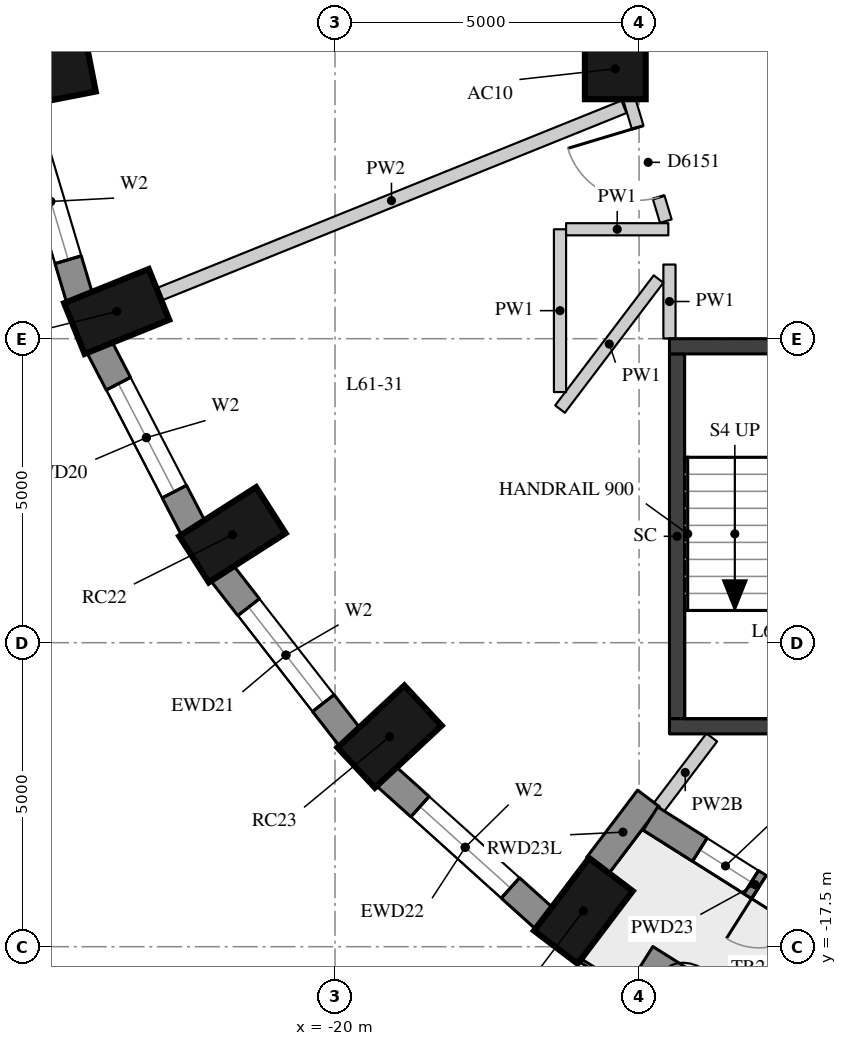
"""IFC4 building model, lengths in metres.
Left out: names, types, materials, properties, quantities, classifications, styles, units other than length and angle.
Written with IfcOpenShell. Run it as: python <this file> out.ifc"""

import sys

from ifc_helpers import new_model, si_unit, direction, frame, frame_2d, origin, origin_2d, place, context, subcontext, project, spatial, rectangle, extrude, element, fill, save


model = new_model("IFC4")
c1 = context("Model", 3, precision=1e-05, world=origin(), true_north=direction((0.0, 1.0)))
c2 = subcontext(c1, "Body", "Model", "MODEL_VIEW")
j1 = project(units=[si_unit("LENGTHUNIT", "METRE"), si_unit("PLANEANGLEUNIT", "RADIAN")], contexts=[c1])
p1 = place(None, origin())
s1 = spatial("IfcSite", under=j1, at=p1, CompositionType="ELEMENT")
p2 = place(p1, origin())
s2 = spatial("IfcBuilding", under=s1, at=p2, CompositionType="ELEMENT")
p3 = place(p2, frame((0.0, 0.0, 215.6)))
s3 = spatial("IfcBuildingStorey", under=s2, at=p3, CompositionType="ELEMENT", Elevation=215.6)
for number, where, z_axis, x_axis in (
    (1, (-24.757, -3.137, 0.0), (0.0, 0.0, 1.0), (-0.981, -0.192, 0.0)),
    (2, (-23.591, -7.052, 0.0), (0.0, 0.0, 1.0), (-0.927, -0.374, 0.0)),
    (3, (-21.687, -10.725, 0.0), (0.0, 0.0, 1.0), (-0.842, -0.539, 0.0)),
    (4, (-19.102, -14.045, 0.0), (0.0, 0.0, 1.0), (-0.732, -0.681, 0.0)),
    (5, (-15.916, -16.911, 0.0), (0.0, 0.0, 1.0), (-0.604, -0.797, 0.0)),
):
    element("IfcColumn", number, at=place(p3, frame(where, z_axis=z_axis, x_axis=x_axis)), inside=s3, PredefinedType="COLUMN", context=c2, shape_type="SweptSolid", body=[
        extrude(rectangle(XDim=1.5, YDim=0.9, at=origin_2d()), origin(), (0.0, 0.0, 1.0), 3.3),
    ])
p4 = place(p3, frame((-15.391, -3.062, 0.0), z_axis=(0.0, 0.0, 1.0), x_axis=(1.0, 0.0, 0.0)))
e6 = element("IfcColumn", 6, at=p4, inside=s3, PredefinedType="COLUMN", context=c2, shape_type="SweptSolid", body=[
    extrude(rectangle(XDim=1.0, YDim=1.0, at=origin_2d()), origin(), (0.0, 0.0, 1.0), 3.3),
])
p5 = place(p3, frame((-25.148, -3.652, 0.0), z_axis=(0.0, 0.0, 1.0), x_axis=(0.285444972963, -0.958395099847, 0.0)))
e7 = element("IfcWall", 7, at=p5, inside=s3, PredefinedType="SOLIDWALL", context=c2, shape_type="SweptSolid", body=[
    extrude(rectangle(XDim=3.32, YDim=0.45, at=frame_2d((1.66, 0.0))), origin(), (0.0, 0.0, 1.0), 3.02),
])
p6 = place(p5, frame((0.66, 0.0, 0.4)))
e8 = element("IfcOpeningElement", 8, at=p6, cuts=e7, PredefinedType="OPENING", context=c2, shape_type="SweptSolid", body=[
    extrude(rectangle(XDim=2.0, YDim=1.75, at=frame_2d((1.0, 0.875))), frame((0.0, 0.235, 0.0), z_axis=(0.0, -1.0, 0.0), x_axis=(1.0, 0.0, 0.0)), (0.0, 0.0, 1.0), 0.47),
])
p7 = place(p3, frame((-23.878, -7.632, 0.0), z_axis=(0.0, 0.0, 1.0), x_axis=(0.460232593174, -0.887798378113, 0.0)))
e9 = element("IfcWall", 9, at=p7, inside=s3, PredefinedType="SOLIDWALL", context=c2, shape_type="SweptSolid", body=[
    extrude(rectangle(XDim=3.371, YDim=0.45, at=frame_2d((1.685, 0.0))), origin(), (0.0, 0.0, 1.0), 3.02),
])
p8 = place(p7, frame((0.685, 0.0, 0.4)))
e10 = element("IfcOpeningElement", 10, at=p8, cuts=e9, PredefinedType="OPENING", context=c2, shape_type="SweptSolid", body=[
    extrude(rectangle(XDim=2.0, YDim=1.75, at=frame_2d((1.0, 0.875))), frame((0.0, 0.235, 0.0), z_axis=(0.0, -1.0, 0.0), x_axis=(1.0, 0.0, 0.0)), (0.0, 0.0, 1.0), 0.47),
])
p9 = place(p3, frame((-21.863, -11.348, 0.0), z_axis=(0.0, 0.0, 1.0), x_axis=(0.614255239631, -0.789107407509, 0.0)))
e11 = element("IfcWall", 11, at=p9, inside=s3, PredefinedType="SOLIDWALL", context=c2, shape_type="SweptSolid", body=[
    extrude(rectangle(XDim=3.438, YDim=0.45, at=frame_2d((1.719, 0.0))), origin(), (0.0, 0.0, 1.0), 3.02),
])
p10 = place(p9, frame((0.719, 0.0, 0.4)))
e12 = element("IfcOpeningElement", 12, at=p10, cuts=e11, PredefinedType="OPENING", context=c2, shape_type="SweptSolid", body=[
    extrude(rectangle(XDim=2.0, YDim=1.75, at=frame_2d((1.0, 0.875))), frame((0.0, 0.235, 0.0), z_axis=(0.0, -1.0, 0.0), x_axis=(1.0, 0.0, 0.0)), (0.0, 0.0, 1.0), 0.47),
])
p11 = place(p3, frame((-19.165, -14.69, 0.0), z_axis=(0.0, 0.0, 1.0), x_axis=(0.743442727602, -0.668799604348, 0.0)))
e13 = element("IfcWall", 13, at=p11, inside=s3, PredefinedType="SOLIDWALL", context=c2, shape_type="SweptSolid", body=[
    extrude(rectangle(XDim=3.513, YDim=0.45, at=frame_2d((1.756, 0.0))), origin(), (0.0, 0.0, 1.0), 3.02),
])
p12 = place(p11, frame((0.756, 0.0, 0.4)))
e14 = element("IfcOpeningElement", 14, at=p12, cuts=e13, PredefinedType="OPENING", context=c2, shape_type="SweptSolid", body=[
    extrude(rectangle(XDim=2.0, YDim=1.75, at=frame_2d((1.0, 0.875))), frame((0.0, 0.235, 0.0), z_axis=(0.0, -1.0, 0.0), x_axis=(1.0, 0.0, 0.0)), (0.0, 0.0, 1.0), 0.47),
])
p13 = place(p3, frame((-15.685, -16.17, 0.0), z_axis=(0.0, 0.0, 1.0), x_axis=(0.603644757989, 0.797253414011, 0.0)))
e15 = element("IfcWall", 15, at=p13, inside=s3, PredefinedType="SOLIDWALL", context=c2, shape_type="SweptSolid", body=[
    extrude(rectangle(XDim=1.391, YDim=0.45, at=frame_2d((0.695, 0.0))), origin(), (0.0, 0.0, 1.0), 2.57),
])
p14 = place(p3, frame((-14.813, -15.392, 0.0), z_axis=(0.0, 0.0, 1.0), x_axis=(0.84545185308, -0.534051649303, 0.0)))
e16 = element("IfcWall", 16, at=p14, inside=s3, PredefinedType="SOLIDWALL", context=c2, shape_type="SweptSolid", body=[
    extrude(rectangle(XDim=4.071, YDim=0.45, at=frame_2d((2.036, 0.0))), origin(), (0.0, 0.0, 1.0), 3.02),
])
p15 = place(p14, frame((0.961, 0.0, 0.4)))
e17 = element("IfcOpeningElement", 17, at=p15, cuts=e16, PredefinedType="OPENING", context=c2, shape_type="SweptSolid", body=[
    extrude(rectangle(XDim=1.0, YDim=1.75, at=frame_2d((0.5, 0.875))), frame((0.0, 0.235, 0.0), z_axis=(0.0, -1.0, 0.0), x_axis=(1.0, 0.0, 0.0)), (0.0, 0.0, 1.0), 0.47),
])
p16 = place(p14, frame((2.111, 0.0, 0.0)))
e18 = element("IfcOpeningElement", 18, at=p16, cuts=e16, PredefinedType="OPENING", context=c2, shape_type="SweptSolid", body=[
    extrude(rectangle(XDim=1.0, YDim=2.15, at=frame_2d((0.5, 1.075))), frame((0.0, 0.235, 0.0), z_axis=(0.0, -1.0, 0.0), x_axis=(1.0, 0.0, 0.0)), (0.0, 0.0, 1.0), 0.47),
])
p17 = place(p3, frame((-14.96, -17.793, 0.0), z_axis=(0.0, 0.0, 1.0), x_axis=(0.846126379677, -0.532982316418, 0.0)))
e19 = element("IfcWall", 19, at=p17, inside=s3, PredefinedType="USERDEFINED", context=c2, shape_type="SweptSolid", body=[
    extrude(rectangle(XDim=1.8, YDim=0.7, at=frame_2d((0.9, 0.0))), origin(), (0.0, 0.0, 1.0), 0.75),
])
p18 = place(p3, frame((-14.375, -13.75, -0.28), z_axis=(0.0, 0.0, 1.0), x_axis=(0.0, 1.0, 0.0)))
e20 = element("IfcWall", 20, at=p18, inside=s3, PredefinedType="SHEAR", context=c2, shape_type="SweptSolid", body=[
    extrude(rectangle(XDim=6.0, YDim=0.25, at=frame_2d((3.0, 0.0))), origin(), (0.0, 0.0, 1.0), 3.3),
])
for number, where, z_axis, x_axis in (
    (21, (-14.5, -7.625, -0.28), (0.0, 0.0, 1.0), (1.0, 0.0, 0.0)),
    (22, (-14.5, -13.875, -0.28), (0.0, 0.0, 1.0), (1.0, 0.0, 0.0)),
):
    element("IfcWall", number, at=place(p3, frame(where, z_axis=z_axis, x_axis=x_axis)), inside=s3, PredefinedType="SHEAR", context=c2, shape_type="SweptSolid", body=[
        extrude(rectangle(XDim=5.2, YDim=0.25, at=frame_2d((2.6, 0.0))), origin(), (0.0, 0.0, 1.0), 3.3),
    ])
p19 = place(p3, frame((-14.5, -7.496, 0.0), z_axis=(0.0, 0.0, 1.0), x_axis=(0.0, 1.0, 0.0)))
e23 = element("IfcWall", 23, at=p19, inside=s3, PredefinedType="PARTITIONING", context=c2, shape_type="SweptSolid", body=[
    extrude(rectangle(XDim=1.216, YDim=0.2, at=frame_2d((0.608, 0.0))), origin(), (0.0, 0.0, 1.0), 3.02),
])
p20 = place(p3, frame((-14.679, -6.518, 0.0), z_axis=(0.0, 0.0, 1.0), x_axis=(-0.603820908912, -0.797120009761, 0.0)))
e24 = element("IfcWall", 24, at=p20, inside=s3, PredefinedType="PARTITIONING", context=c2, shape_type="SweptSolid", body=[
    extrude(rectangle(XDim=2.684, YDim=0.2, at=frame_2d((1.342, 0.0))), origin(), (0.0, 0.0, 1.0), 3.02),
])
p21 = place(p3, frame((-16.3, -8.377, 0.0), z_axis=(0.0, 0.0, 1.0), x_axis=(0.0, 1.0, 0.0)))
e25 = element("IfcWall", 25, at=p21, inside=s3, PredefinedType="PARTITIONING", context=c2, shape_type="SweptSolid", body=[
    extrude(rectangle(XDim=2.677, YDim=0.2, at=frame_2d((1.339, 0.0))), origin(), (0.0, 0.0, 1.0), 3.02),
])
p22 = place(p3, frame((-16.2, -5.7, 0.0), z_axis=(0.0, 0.0, 1.0), x_axis=(1.0, 0.0, 0.0)))
e26 = element("IfcWall", 26, at=p22, inside=s3, PredefinedType="PARTITIONING", context=c2, shape_type="SweptSolid", body=[
    extrude(rectangle(XDim=1.681, YDim=0.2, at=frame_2d((0.841, 0.0))), origin(), (0.0, 0.0, 1.0), 3.02),
])
p23 = place(p3, frame((-14.56, -5.567, 0.0), z_axis=(0.0, 0.0, 1.0), x_axis=(-0.287410918602, 0.95780737305, 0.0)))
e27 = element("IfcWall", 27, at=p23, inside=s3, PredefinedType="PARTITIONING", context=c2, shape_type="SweptSolid", body=[
    extrude(rectangle(XDim=6.751, YDim=0.2, at=frame_2d((3.376, 0.0))), origin(), (0.0, 0.0, 1.0), 2.52),
])
p24 = place(p23, frame((3.561, 0.0, 0.0)))
e28 = element("IfcOpeningElement", 28, at=p24, cuts=e27, PredefinedType="OPENING", context=c2, shape_type="SweptSolid", body=[
    extrude(rectangle(XDim=1.1, YDim=2.1, at=frame_2d((0.55, 1.05))), frame((0.0, 0.11, 0.0), z_axis=(0.0, -1.0, 0.0), x_axis=(1.0, 0.0, 0.0)), (0.0, 0.0, 1.0), 0.22),
])
p25 = place(p23, frame((0.41, 0.0, 0.0)))
e29 = element("IfcOpeningElement", 29, at=p25, cuts=e27, PredefinedType="OPENING", context=c2, shape_type="SweptSolid", body=[
    extrude(rectangle(XDim=1.2, YDim=2.1, at=frame_2d((0.6, 1.05))), frame((0.0, 0.11, 0.0), z_axis=(0.0, -1.0, 0.0), x_axis=(1.0, 0.0, 0.0)), (0.0, 0.0, 1.0), 0.22),
])
p26 = place(p3, frame((-22.896, -6.771, 0.0), z_axis=(0.0, 0.0, 1.0), x_axis=(0.92738233242, 0.374114968313, 0.0)))
e30 = element("IfcWall", 30, at=p26, inside=s3, PredefinedType="PARTITIONING", context=c2, shape_type="SweptSolid", body=[
    extrude(rectangle(XDim=8.246, YDim=0.22, at=frame_2d((4.123, 0.0))), origin(), (0.0, 0.0, 1.0), 3.02),
])
p27 = place(p3, frame((-14.677, -15.211, 0.0), z_axis=(0.0, 0.0, 1.0), x_axis=(0.603665965776, 0.797237355976, 0.0)))
e31 = element("IfcWall", 31, at=p27, inside=s3, PredefinedType="PARTITIONING", context=c2, shape_type="SweptSolid", body=[
    extrude(rectangle(XDim=1.447, YDim=0.22, at=frame_2d((0.723, 0.0))), origin(), (0.0, 0.0, 1.0), 2.57),
])
p28 = place(p3, frame((-11.927, -3.927, 0.0), z_axis=(0.0, 0.0, 1.0), x_axis=(-0.382730523909, 0.923860025149, 0.0)))
e32 = element("IfcWall", 32, at=p28, inside=s3, PredefinedType="PARTITIONING", context=c2, shape_type="SweptSolid", body=[
    extrude(rectangle(XDim=4.251, YDim=0.1, at=frame_2d((2.125, 0.0))), origin(), (0.0, 0.0, 1.0), 3.02),
])
p29 = place(p6, origin())
e33 = element("IfcWindow", 33, at=p29, inside=s3, PartitioningType="SINGLE_PANEL", PredefinedType="WINDOW", context=c2, shape_type="SweptSolid", body=[
    extrude(rectangle(XDim=2.0, YDim=1.75, at=frame_2d((1.0, 0.875))), frame((0.0, 0.035, 0.0), z_axis=(0.0, -1.0, 0.0), x_axis=(1.0, 0.0, 0.0)), (0.0, 0.0, 1.0), 0.06),
])
fill(e8, e33)
p30 = place(p8, origin())
e34 = element("IfcWindow", 34, at=p30, inside=s3, PartitioningType="SINGLE_PANEL", PredefinedType="WINDOW", context=c2, shape_type="SweptSolid", body=[
    extrude(rectangle(XDim=2.0, YDim=1.75, at=frame_2d((1.0, 0.875))), frame((0.0, 0.035, 0.0), z_axis=(0.0, -1.0, 0.0), x_axis=(1.0, 0.0, 0.0)), (0.0, 0.0, 1.0), 0.06),
])
fill(e10, e34)
p31 = place(p10, origin())
e35 = element("IfcWindow", 35, at=p31, inside=s3, PartitioningType="SINGLE_PANEL", PredefinedType="WINDOW", context=c2, shape_type="SweptSolid", body=[
    extrude(rectangle(XDim=2.0, YDim=1.75, at=frame_2d((1.0, 0.875))), frame((0.0, 0.035, 0.0), z_axis=(0.0, -1.0, 0.0), x_axis=(1.0, 0.0, 0.0)), (0.0, 0.0, 1.0), 0.06),
])
fill(e12, e35)
p32 = place(p12, origin())
e36 = element("IfcWindow", 36, at=p32, inside=s3, PartitioningType="SINGLE_PANEL", PredefinedType="WINDOW", context=c2, shape_type="SweptSolid", body=[
    extrude(rectangle(XDim=2.0, YDim=1.75, at=frame_2d((1.0, 0.875))), frame((0.0, 0.035, 0.0), z_axis=(0.0, -1.0, 0.0), x_axis=(1.0, 0.0, 0.0)), (0.0, 0.0, 1.0), 0.06),
])
fill(e14, e36)
p33 = place(p15, origin())
e37 = element("IfcWindow", 37, at=p33, inside=s3, PartitioningType="SINGLE_PANEL", PredefinedType="WINDOW", context=c2, shape_type="SweptSolid", body=[
    extrude(rectangle(XDim=1.0, YDim=1.75, at=frame_2d((0.5, 0.875))), frame((0.0, 0.035, 0.0), z_axis=(0.0, -1.0, 0.0), x_axis=(1.0, 0.0, 0.0)), (0.0, 0.0, 1.0), 0.06),
])
fill(e17, e37)
p34 = place(p16, frame((1.0, 0.0, 0.0), z_axis=(0.0, 0.0, 1.0), x_axis=(-1.0, 0.0, 0.0)))
e38 = element("IfcDoor", 38, at=p34, inside=s3, OperationType="SINGLE_SWING_RIGHT", PredefinedType="DOOR", context=c2, shape_type="SweptSolid", body=[
    extrude(rectangle(XDim=1.0, YDim=2.15, at=frame_2d((0.5, 1.075))), frame((0.0, 0.075, 0.0), z_axis=(0.0, -1.0, 0.0), x_axis=(1.0, 0.0, 0.0)), (0.0, 0.0, 1.0), 0.05),
])
fill(e18, e38)
p35 = place(p25, origin())
e39 = element("IfcDoor", 39, at=p35, inside=s3, OperationType="SINGLE_SWING_RIGHT", PredefinedType="DOOR", context=c2, shape_type="SweptSolid", body=[
    extrude(rectangle(XDim=1.2, YDim=2.1, at=frame_2d((0.6, 1.05))), frame((0.0, 0.025, 0.0), z_axis=(0.0, -1.0, 0.0), x_axis=(1.0, 0.0, 0.0)), (0.0, 0.0, 1.0), 0.05),
])
fill(e29, e39)
save(model, sys.argv[1])
